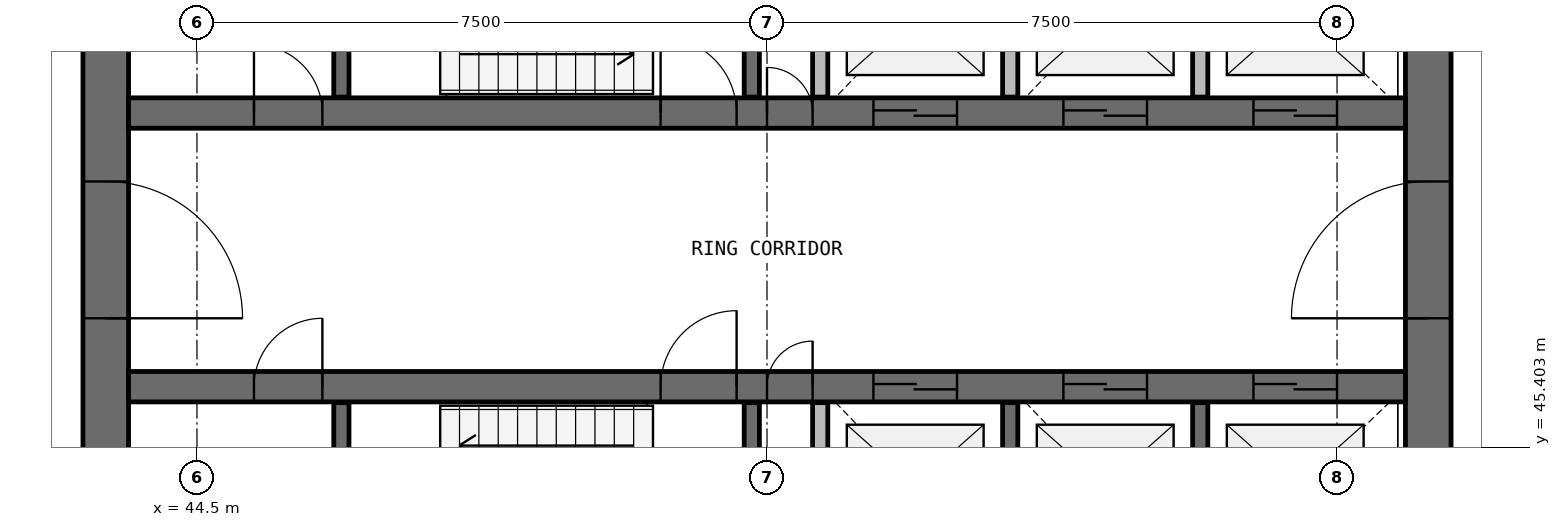
"""IFC4 building model, lengths in metres.
Left out: names, types, materials, properties, quantities, classifications, styles, units other than length and angle.
Written with IfcOpenShell. Run it as: python <this file> out.ifc"""

import sys

from ifc_helpers import new_model, si_unit, direction, frame, frame_2d, origin, place, context, subcontext, project, spatial, rectangle, extrude, source, transform, mapped, element, fill, save


model = new_model("IFC4")
c1 = context("Model", 3, precision=1e-05, world=origin(), true_north=direction((0.0, 1.0)))
c2 = subcontext(c1, "Body", "Model", "MODEL_VIEW")
j1 = project(units=[si_unit("LENGTHUNIT", "METRE"), si_unit("PLANEANGLEUNIT", "RADIAN")], contexts=[c1])
p1 = place(None, origin())
s1 = spatial("IfcSite", under=j1, at=p1, CompositionType="ELEMENT")
p2 = place(p1, origin())
s2 = spatial("IfcBuilding", under=s1, at=p2, CompositionType="ELEMENT")
p3 = place(p2, frame((0.0, 0.0, 265.7)))
s3 = spatial("IfcBuildingStorey", under=s2, at=p3, CompositionType="ELEMENT", Elevation=265.7)
p4 = place(p3, frame((60.7, 40.0, 0.0), z_axis=(0.0, 0.0, 1.0), x_axis=(0.0, 1.0, 0.0)))
e1 = element("IfcWall", 1, at=p4, inside=s3, PredefinedType="SHEAR", context=c2, shape_type="SweptSolid", body=[
    extrude(rectangle(XDim=16.0, YDim=0.6, at=frame_2d((8.0, 0.0))), origin(), (0.0, 0.0, 1.0), 3.9),
])
p5 = place(p4, frame((7.1, 0.0, 0.0)))
e2 = element("IfcOpeningElement", 2, at=p5, cuts=e1, PredefinedType="OPENING", context=c2, shape_type="SweptSolid", body=[
    extrude(rectangle(XDim=1.8, YDim=2.1, at=frame_2d((0.9, 1.05))), frame((0.0, 0.31, 0.0), z_axis=(0.0, -1.0, 0.0), x_axis=(1.0, 0.0, 0.0)), (0.0, 0.0, 1.0), 0.62),
])
p6 = place(p3, frame((43.3, 56.0, 0.0), z_axis=(0.0, 0.0, 1.0), x_axis=(0.0, -1.0, 0.0)))
e3 = element("IfcWall", 3, at=p6, inside=s3, PredefinedType="SHEAR", context=c2, shape_type="SweptSolid", body=[
    extrude(rectangle(XDim=16.0, YDim=0.6, at=frame_2d((8.0, 0.0))), origin(), (0.0, 0.0, 1.0), 3.9),
])
p7 = place(p6, frame((7.1, 0.0, 0.0)))
e4 = element("IfcOpeningElement", 4, at=p7, cuts=e3, PredefinedType="OPENING", context=c2, shape_type="SweptSolid", body=[
    extrude(rectangle(XDim=1.8, YDim=2.1, at=frame_2d((0.9, 1.05))), frame((0.0, 0.31, 0.0), z_axis=(0.0, -1.0, 0.0), x_axis=(1.0, 0.0, 0.0)), (0.0, 0.0, 1.0), 0.62),
])
p8 = place(p3, frame((43.6, 49.8, 0.0), z_axis=(0.0, 0.0, 1.0), x_axis=(1.0, 0.0, 0.0)))
e5 = element("IfcWall", 5, at=p8, inside=s3, PredefinedType="SHEAR", context=c2, shape_type="SweptSolid", body=[
    extrude(rectangle(XDim=16.8, YDim=0.4, at=frame_2d((8.4, 0.0))), origin(), (0.0, 0.0, 1.0), 3.9),
])
p9 = place(p8, frame((9.8, 0.0, 0.0)))
e6 = element("IfcOpeningElement", 6, at=p9, cuts=e5, PredefinedType="OPENING", context=c2, shape_type="SweptSolid", body=[
    extrude(rectangle(XDim=1.1, YDim=2.1, at=frame_2d((0.55, 1.05))), frame((0.0, 0.21, 0.0), z_axis=(0.0, -1.0, 0.0), x_axis=(1.0, 0.0, 0.0)), (0.0, 0.0, 1.0), 0.42),
])
p10 = place(p8, frame((12.3, 0.0, 0.0)))
e7 = element("IfcOpeningElement", 7, at=p10, cuts=e5, PredefinedType="OPENING", context=c2, shape_type="SweptSolid", body=[
    extrude(rectangle(XDim=1.1, YDim=2.1, at=frame_2d((0.55, 1.05))), frame((0.0, 0.21, 0.0), z_axis=(0.0, -1.0, 0.0), x_axis=(1.0, 0.0, 0.0)), (0.0, 0.0, 1.0), 0.42),
])
p11 = place(p8, frame((14.8, 0.0, 0.0)))
e8 = element("IfcOpeningElement", 8, at=p11, cuts=e5, PredefinedType="OPENING", context=c2, shape_type="SweptSolid", body=[
    extrude(rectangle(XDim=1.1, YDim=2.1, at=frame_2d((0.55, 1.05))), frame((0.0, 0.21, 0.0), z_axis=(0.0, -1.0, 0.0), x_axis=(1.0, 0.0, 0.0)), (0.0, 0.0, 1.0), 0.42),
])
p12 = place(p8, frame((7.0, 0.0, 0.0)))
e9 = element("IfcOpeningElement", 9, at=p12, cuts=e5, PredefinedType="OPENING", context=c2, shape_type="SweptSolid", body=[
    extrude(rectangle(XDim=1.0, YDim=2.1, at=frame_2d((0.5, 1.05))), frame((0.0, 0.21, 0.0), z_axis=(0.0, -1.0, 0.0), x_axis=(1.0, 0.0, 0.0)), (0.0, 0.0, 1.0), 0.42),
])
p13 = place(p8, frame((8.4, 0.0, 0.0)))
e10 = element("IfcOpeningElement", 10, at=p13, cuts=e5, PredefinedType="OPENING", context=c2, shape_type="SweptSolid", body=[
    extrude(rectangle(XDim=0.6, YDim=2.1, at=frame_2d((0.3, 1.05))), frame((0.0, 0.21, 0.0), z_axis=(0.0, -1.0, 0.0), x_axis=(1.0, 0.0, 0.0)), (0.0, 0.0, 1.0), 0.42),
])
p14 = place(p8, frame((1.65, 0.0, 0.0)))
e11 = element("IfcOpeningElement", 11, at=p14, cuts=e5, PredefinedType="OPENING", context=c2, shape_type="SweptSolid", body=[
    extrude(rectangle(XDim=0.9, YDim=2.1, at=frame_2d((0.45, 1.05))), frame((0.0, 0.21, 0.0), z_axis=(0.0, -1.0, 0.0), x_axis=(1.0, 0.0, 0.0)), (0.0, 0.0, 1.0), 0.42),
])
p15 = place(p3, frame((43.6, 46.2, 0.0), z_axis=(0.0, 0.0, 1.0), x_axis=(1.0, 0.0, 0.0)))
e12 = element("IfcWall", 12, at=p15, inside=s3, PredefinedType="SHEAR", context=c2, shape_type="SweptSolid", body=[
    extrude(rectangle(XDim=16.8, YDim=0.4, at=frame_2d((8.4, 0.0))), origin(), (0.0, 0.0, 1.0), 3.9),
])
p16 = place(p15, frame((9.8, 0.0, 0.0)))
e13 = element("IfcOpeningElement", 13, at=p16, cuts=e12, PredefinedType="OPENING", context=c2, shape_type="SweptSolid", body=[
    extrude(rectangle(XDim=1.1, YDim=2.1, at=frame_2d((0.55, 1.05))), frame((0.0, 0.21, 0.0), z_axis=(0.0, -1.0, 0.0), x_axis=(1.0, 0.0, 0.0)), (0.0, 0.0, 1.0), 0.42),
])
p17 = place(p15, frame((12.3, 0.0, 0.0)))
e14 = element("IfcOpeningElement", 14, at=p17, cuts=e12, PredefinedType="OPENING", context=c2, shape_type="SweptSolid", body=[
    extrude(rectangle(XDim=1.1, YDim=2.1, at=frame_2d((0.55, 1.05))), frame((0.0, 0.21, 0.0), z_axis=(0.0, -1.0, 0.0), x_axis=(1.0, 0.0, 0.0)), (0.0, 0.0, 1.0), 0.42),
])
p18 = place(p15, frame((14.8, 0.0, 0.0)))
e15 = element("IfcOpeningElement", 15, at=p18, cuts=e12, PredefinedType="OPENING", context=c2, shape_type="SweptSolid", body=[
    extrude(rectangle(XDim=1.1, YDim=2.1, at=frame_2d((0.55, 1.05))), frame((0.0, 0.21, 0.0), z_axis=(0.0, -1.0, 0.0), x_axis=(1.0, 0.0, 0.0)), (0.0, 0.0, 1.0), 0.42),
])
p19 = place(p15, frame((7.0, 0.0, 0.0)))
e16 = element("IfcOpeningElement", 16, at=p19, cuts=e12, PredefinedType="OPENING", context=c2, shape_type="SweptSolid", body=[
    extrude(rectangle(XDim=1.0, YDim=2.1, at=frame_2d((0.5, 1.05))), frame((0.0, 0.21, 0.0), z_axis=(0.0, -1.0, 0.0), x_axis=(1.0, 0.0, 0.0)), (0.0, 0.0, 1.0), 0.42),
])
p20 = place(p15, frame((8.4, 0.0, 0.0)))
e17 = element("IfcOpeningElement", 17, at=p20, cuts=e12, PredefinedType="OPENING", context=c2, shape_type="SweptSolid", body=[
    extrude(rectangle(XDim=0.6, YDim=2.1, at=frame_2d((0.3, 1.05))), frame((0.0, 0.21, 0.0), z_axis=(0.0, -1.0, 0.0), x_axis=(1.0, 0.0, 0.0)), (0.0, 0.0, 1.0), 0.42),
])
p21 = place(p15, frame((1.65, 0.0, 0.0)))
e18 = element("IfcOpeningElement", 18, at=p21, cuts=e12, PredefinedType="OPENING", context=c2, shape_type="SweptSolid", body=[
    extrude(rectangle(XDim=0.9, YDim=2.1, at=frame_2d((0.45, 1.05))), frame((0.0, 0.21, 0.0), z_axis=(0.0, -1.0, 0.0), x_axis=(1.0, 0.0, 0.0)), (0.0, 0.0, 1.0), 0.42),
])
p22 = place(p3, frame((46.4, 45.99, 0.0), z_axis=(0.0, 0.0, 1.0), x_axis=(0.0, -1.0, 0.0)))
e19 = element("IfcWall", 19, at=p22, inside=s3, PredefinedType="SOLIDWALL", context=c2, shape_type="SweptSolid", body=[
    extrude(rectangle(XDim=2.39, YDim=0.2, at=frame_2d((1.195, 0.0))), origin(), (0.0, 0.0, 1.0), 3.62),
])
for number, where, z_axis, x_axis in (
    (20, (46.4, 52.37, 0.0), (0.0, 0.0, 1.0), (0.0, -1.0, 0.0)),
    (21, (51.8, 43.63, 0.0), (0.0, 0.0, 1.0), (0.0, 1.0, 0.0)),
):
    element("IfcWall", number, at=place(p3, frame(where, z_axis=z_axis, x_axis=x_axis)), inside=s3, PredefinedType="SOLIDWALL", context=c2, shape_type="SweptSolid", body=[
        extrude(rectangle(XDim=2.36, YDim=0.2, at=frame_2d((1.18, 0.0))), origin(), (0.0, 0.0, 1.0), 3.62),
    ])
for number, where, z_axis, x_axis in (
    (22, (51.8, 50.01, 0.0), (0.0, 0.0, 1.0), (0.0, 1.0, 0.0)),
    (23, (52.7, 45.99, 0.0), (0.0, 0.0, 1.0), (0.0, -1.0, 0.0)),
):
    element("IfcWall", number, at=place(p3, frame(where, z_axis=z_axis, x_axis=x_axis)), inside=s3, PredefinedType="SOLIDWALL", context=c2, shape_type="SweptSolid", body=[
        extrude(rectangle(XDim=2.39, YDim=0.2, at=frame_2d((1.195, 0.0))), origin(), (0.0, 0.0, 1.0), 3.62),
    ])
for number, where, z_axis, x_axis in (
    (24, (52.7, 52.37, 0.0), (0.0, 0.0, 1.0), (0.0, -1.0, 0.0)),
    (25, (55.2, 43.63, 0.0), (0.0, 0.0, 1.0), (0.0, 1.0, 0.0)),
    (26, (55.2, 50.01, 0.0), (0.0, 0.0, 1.0), (0.0, 1.0, 0.0)),
    (27, (57.7, 43.63, 0.0), (0.0, 0.0, 1.0), (0.0, 1.0, 0.0)),
):
    element("IfcWall", number, at=place(p3, frame(where, z_axis=z_axis, x_axis=x_axis)), inside=s3, PredefinedType="SOLIDWALL", context=c2, shape_type="SweptSolid", body=[
        extrude(rectangle(XDim=2.36, YDim=0.2, at=frame_2d((1.18, 0.0))), origin(), (0.0, 0.0, 1.0), 3.62),
    ])
p23 = place(p3, frame((57.7, 50.01, 0.0), z_axis=(0.0, 0.0, 1.0), x_axis=(0.0, 1.0, 0.0)))
e28 = element("IfcWall", 28, at=p23, inside=s3, PredefinedType="SOLIDWALL", context=c2, shape_type="SweptSolid", body=[
    extrude(rectangle(XDim=2.39, YDim=0.2, at=frame_2d((1.195, 0.0))), origin(), (0.0, 0.0, 1.0), 3.62),
])
m1 = source(origin(), c2, "Body", "SweptSolid", [
    extrude(rectangle(XDim=1.8, YDim=2.1, at=frame_2d((0.9, 1.05))), frame((0.0, 0.025, 0.0), z_axis=(0.0, -1.0, 0.0), x_axis=(1.0, 0.0, 0.0)), (0.0, 0.0, 1.0), 0.05),
])
p24 = place(p7, origin())
e29 = element("IfcDoor", 29, at=p24, inside=s3, OperationType="SINGLE_SWING_RIGHT", PredefinedType="DOOR", context=c2, shape_type="MappedRepresentation", body=[
    mapped(m1, transform((0.0, 0.0, 0.0), scale=1.0)),
])
fill(e4, e29)
p25 = place(p5, origin())
e30 = element("IfcDoor", 30, at=p25, inside=s3, OperationType="SINGLE_SWING_LEFT", PredefinedType="DOOR", context=c2, shape_type="MappedRepresentation", body=[
    mapped(m1, transform((0.0, 0.0, 0.0), scale=1.0)),
])
fill(e2, e30)
m2 = source(origin(), c2, "Body", "SweptSolid", [
    extrude(rectangle(XDim=1.1, YDim=2.1, at=frame_2d((0.55, 1.05))), frame((0.0, 0.025, 0.0), z_axis=(0.0, -1.0, 0.0), x_axis=(1.0, 0.0, 0.0)), (0.0, 0.0, 1.0), 0.05),
])
p26 = place(p9, origin())
e31 = element("IfcDoor", 31, at=p26, inside=s3, OperationType="DOUBLE_DOOR_SLIDING", PredefinedType="USERDEFINED", context=c2, shape_type="MappedRepresentation", body=[
    mapped(m2, transform((0.0, 0.0, 0.0), scale=1.0)),
])
fill(e6, e31)
p27 = place(p10, origin())
e32 = element("IfcDoor", 32, at=p27, inside=s3, OperationType="DOUBLE_DOOR_SLIDING", PredefinedType="USERDEFINED", context=c2, shape_type="MappedRepresentation", body=[
    mapped(m2, transform((0.0, 0.0, 0.0), scale=1.0)),
])
fill(e7, e32)
p28 = place(p11, origin())
e33 = element("IfcDoor", 33, at=p28, inside=s3, OperationType="DOUBLE_DOOR_SLIDING", PredefinedType="USERDEFINED", context=c2, shape_type="MappedRepresentation", body=[
    mapped(m2, transform((0.0, 0.0, 0.0), scale=1.0)),
])
fill(e8, e33)
p29 = place(p16, origin())
e34 = element("IfcDoor", 34, at=p29, inside=s3, OperationType="DOUBLE_DOOR_SLIDING", PredefinedType="USERDEFINED", context=c2, shape_type="MappedRepresentation", body=[
    mapped(m2, transform((0.0, 0.0, 0.0), scale=1.0)),
])
fill(e13, e34)
p30 = place(p17, origin())
e35 = element("IfcDoor", 35, at=p30, inside=s3, OperationType="DOUBLE_DOOR_SLIDING", PredefinedType="USERDEFINED", context=c2, shape_type="MappedRepresentation", body=[
    mapped(m2, transform((0.0, 0.0, 0.0), scale=1.0)),
])
fill(e14, e35)
p31 = place(p18, origin())
e36 = element("IfcDoor", 36, at=p31, inside=s3, OperationType="DOUBLE_DOOR_SLIDING", PredefinedType="USERDEFINED", context=c2, shape_type="MappedRepresentation", body=[
    mapped(m2, transform((0.0, 0.0, 0.0), scale=1.0)),
])
fill(e15, e36)
m3 = source(origin(), c2, "Body", "SweptSolid", [
    extrude(rectangle(XDim=1.0, YDim=2.1, at=frame_2d((0.5, 1.05))), frame((0.0, 0.025, 0.0), z_axis=(0.0, -1.0, 0.0), x_axis=(1.0, 0.0, 0.0)), (0.0, 0.0, 1.0), 0.05),
])
p32 = place(p12, origin())
e37 = element("IfcDoor", 37, at=p32, inside=s3, OperationType="SINGLE_SWING_LEFT", PredefinedType="DOOR", context=c2, shape_type="MappedRepresentation", body=[
    mapped(m3, transform((0.0, 0.0, 0.0), scale=1.0)),
])
fill(e9, e37)
p33 = place(p19, origin())
e38 = element("IfcDoor", 38, at=p33, inside=s3, OperationType="SINGLE_SWING_RIGHT", PredefinedType="DOOR", context=c2, shape_type="MappedRepresentation", body=[
    mapped(m3, transform((0.0, 0.0, 0.0), scale=1.0)),
])
fill(e16, e38)
m4 = source(origin(), c2, "Body", "SweptSolid", [
    extrude(rectangle(XDim=0.6, YDim=2.1, at=frame_2d((0.3, 1.05))), frame((0.0, 0.025, 0.0), z_axis=(0.0, -1.0, 0.0), x_axis=(1.0, 0.0, 0.0)), (0.0, 0.0, 1.0), 0.05),
])
p34 = place(p13, origin())
e39 = element("IfcDoor", 39, at=p34, inside=s3, OperationType="SINGLE_SWING_LEFT", PredefinedType="DOOR", context=c2, shape_type="MappedRepresentation", body=[
    mapped(m4, transform((0.0, 0.0, 0.0), scale=1.0)),
])
fill(e10, e39)
p35 = place(p20, origin())
e40 = element("IfcDoor", 40, at=p35, inside=s3, OperationType="SINGLE_SWING_RIGHT", PredefinedType="DOOR", context=c2, shape_type="MappedRepresentation", body=[
    mapped(m4, transform((0.0, 0.0, 0.0), scale=1.0)),
])
fill(e17, e40)
m5 = source(origin(), c2, "Body", "SweptSolid", [
    extrude(rectangle(XDim=0.9, YDim=2.1, at=frame_2d((0.45, 1.05))), frame((0.0, 0.025, 0.0), z_axis=(0.0, -1.0, 0.0), x_axis=(1.0, 0.0, 0.0)), (0.0, 0.0, 1.0), 0.05),
])
p36 = place(p14, origin())
e41 = element("IfcDoor", 41, at=p36, inside=s3, OperationType="SINGLE_SWING_LEFT", PredefinedType="DOOR", context=c2, shape_type="MappedRepresentation", body=[
    mapped(m5, transform((0.0, 0.0, 0.0), scale=1.0)),
])
fill(e11, e41)
p37 = place(p21, origin())
e42 = element("IfcDoor", 42, at=p37, inside=s3, OperationType="SINGLE_SWING_RIGHT", PredefinedType="DOOR", context=c2, shape_type="MappedRepresentation", body=[
    mapped(m5, transform((0.0, 0.0, 0.0), scale=1.0)),
])
fill(e18, e42)
save(model, sys.argv[1])
